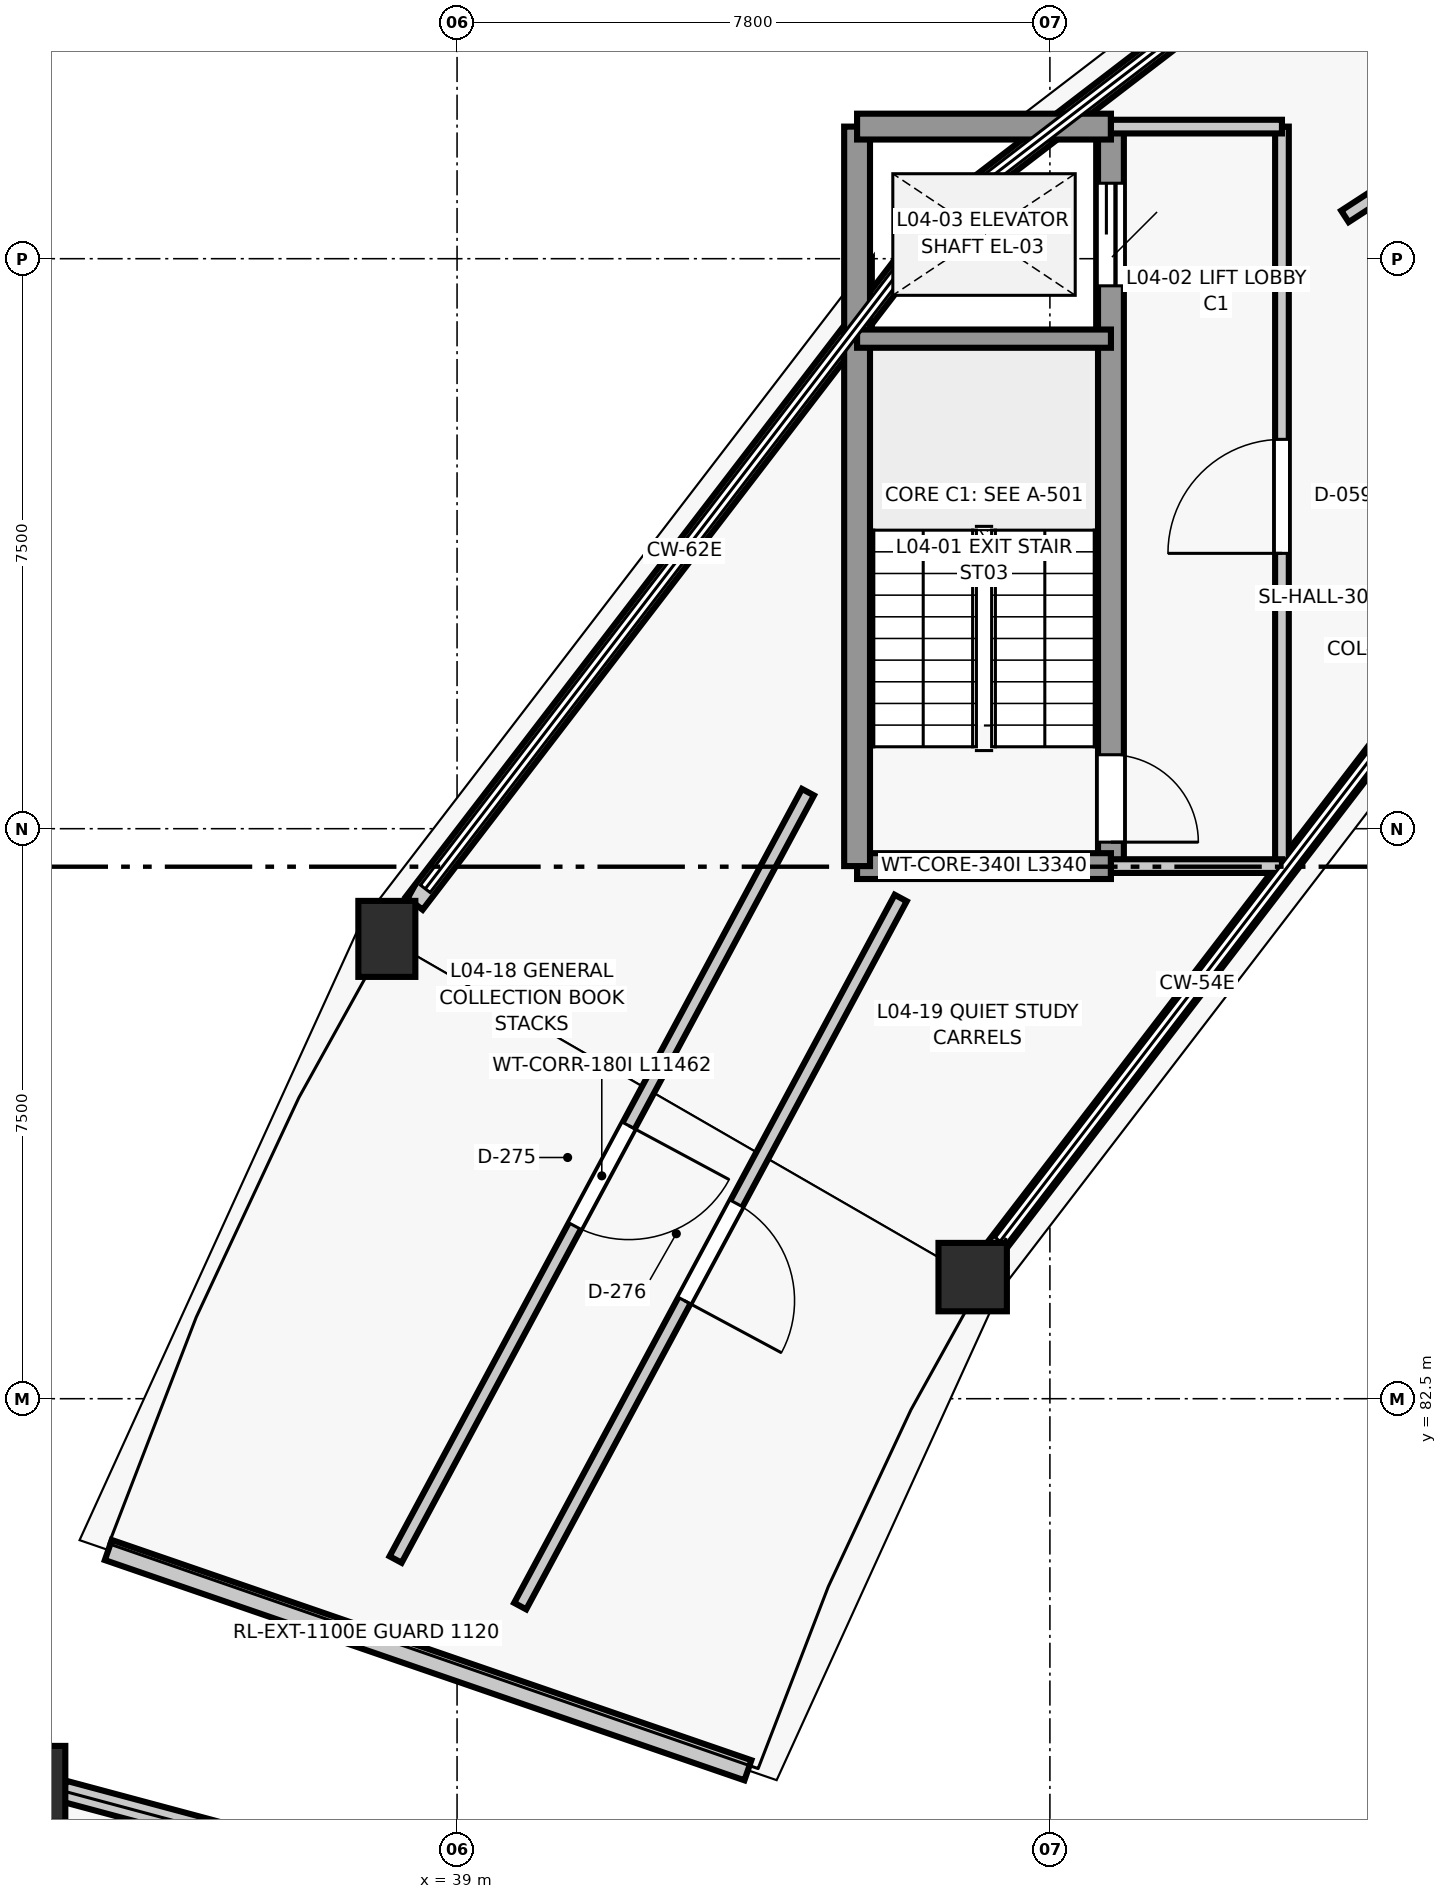
"""IFC4 building model, lengths in metres.
Left out: names, types, materials, properties, quantities, classifications, styles, units other than length and angle.
Written with IfcOpenShell. Run it as: python <this file> out.ifc"""

import sys

from ifc_helpers import new_model, si_unit, direction, frame, frame_2d, origin, origin_2d, place, context, subcontext, project, spatial, rectangle, circle, extrude, element, fill, save


model = new_model("IFC4")
c1 = context("Model", 3, precision=1e-05, world=origin(), true_north=direction((0.0, 1.0)))
c2 = subcontext(c1, "Body", "Model", "MODEL_VIEW")
j1 = project(units=[si_unit("LENGTHUNIT", "METRE"), si_unit("PLANEANGLEUNIT", "RADIAN")], contexts=[c1])
p1 = place(None, origin())
s1 = spatial("IfcSite", under=j1, at=p1, CompositionType="ELEMENT")
p2 = place(p1, origin())
s2 = spatial("IfcBuilding", under=s1, at=p2, CompositionType="ELEMENT")
p3 = place(p2, frame((0.0, 0.0, 16.5)))
s3 = spatial("IfcBuildingStorey", under=s2, at=p3, CompositionType="ELEMENT", Elevation=16.5)
p4 = place(p3, frame((45.784, 84.1, 0.0), z_axis=(0.0, 0.0, 1.0), x_axis=(1.0, 0.0, 0.0)))
e1 = element("IfcColumn", 1, at=p4, inside=s3, PredefinedType="COLUMN", context=c2, shape_type="SweptSolid", body=[
    extrude(circle(Radius=0.45, at=origin_2d()), origin(), (0.0, 0.0, 1.0), 3.9),
])
for number, where, z_axis, x_axis in (
    (2, (38.076, 88.55, 0.0), (0.0, 0.0, 1.0), (1.0, 0.0, 0.0)),
    (3, (33.471, 77.432, 0.0), (0.0, 0.0, 1.0), (1.0, 0.0, 0.0)),
):
    element("IfcColumn", number, at=place(p3, frame(where, z_axis=z_axis, x_axis=x_axis)), inside=s3, PredefinedType="COLUMN", context=c2, shape_type="SweptSolid", body=[
        extrude(rectangle(XDim=0.75, YDim=1.0, at=origin_2d()), origin(), (0.0, 0.0, 1.0), 3.9),
    ])
p5 = place(p3, frame((45.402, 98.098, 0.0), z_axis=(0.0, 0.0, 1.0), x_axis=(0.793347191248, 0.608769442514, 0.0)))
e4 = element("IfcWall", 4, at=p5, inside=s3, PredefinedType="STANDARD", context=c2, shape_type="SweptSolid", body=[
    extrude(rectangle(XDim=11.587, YDim=0.28, at=frame_2d((5.793, 0.0))), origin(), (0.0, 0.0, 1.0), 0.82),
])
p6 = place(p3, frame((38.436, 89.019, 0.0), z_axis=(0.0, 0.0, 1.0), x_axis=(0.608753523874, 0.793359406052, 0.0)))
e5 = element("IfcWall", 5, at=p6, inside=s3, PredefinedType="STANDARD", context=c2, shape_type="SweptSolid", body=[
    extrude(rectangle(XDim=11.444, YDim=0.28, at=frame_2d((5.722, 0.0))), origin(), (0.0, 0.0, 1.0), 0.82),
])
p7 = place(p3, frame((51.481, 91.524, 0.0), z_axis=(0.0, 0.0, 1.0), x_axis=(-0.608769580289, -0.793347085527, 0.0)))
e6 = element("IfcWall", 6, at=p7, inside=s3, PredefinedType="STANDARD", context=c2, shape_type="SweptSolid", body=[
    extrude(rectangle(XDim=9.005, YDim=0.25, at=frame_2d((4.502, 0.0))), origin(), (0.0, 0.0, 1.0), 0.82),
])
p8 = place(p3, frame((42.827, 77.611, 0.0), z_axis=(0.0, 0.0, 1.0), x_axis=(-0.945512530801, 0.325585709298, 0.0)))
e7 = element("IfcWall", 7, at=p8, inside=s3, PredefinedType="STANDARD", context=c2, shape_type="SweptSolid", body=[
    extrude(rectangle(XDim=8.9, YDim=0.28, at=frame_2d((4.45, 0.0))), origin(), (0.0, 0.0, 1.0), 3.63),
])
p9 = place(p3, frame((33.822, 77.338, 0.0), z_axis=(0.0, 0.0, 1.0), x_axis=(0.965919918576, -0.258841091981, 0.0)))
e8 = element("IfcWall", 8, at=p9, inside=s3, PredefinedType="STANDARD", context=c2, shape_type="SweptSolid", body=[
    extrude(rectangle(XDim=8.251, YDim=0.28, at=frame_2d((4.125, 0.0))), origin(), (0.0, 0.0, 1.0), 2.997),
])
p10 = place(p3, frame((47.603, 99.238, 0.0), z_axis=(0.0, 0.0, 1.0), x_axis=(0.0, -1.0, 0.0)))
e9 = element("IfcWall", 9, at=p10, inside=s3, PredefinedType="SHEAR", context=c2, shape_type="SweptSolid", body=[
    extrude(rectangle(XDim=9.73, YDim=0.34, at=frame_2d((4.865, 0.0))), origin(), (0.0, 0.0, 1.0), 3.9),
])
p11 = place(p10, frame((8.265, 0.0, 0.0)))
e10 = element("IfcOpeningElement", 10, at=p11, cuts=e9, PredefinedType="OPENING", context=c2, shape_type="SweptSolid", body=[
    extrude(rectangle(XDim=1.15, YDim=2.15, at=frame_2d((0.575, 1.075))), frame((0.0, 0.18, 0.0), z_axis=(0.0, -1.0, 0.0), x_axis=(1.0, 0.0, 0.0)), (0.0, 0.0, 1.0), 0.36),
])
p12 = place(p10, frame((0.745, 0.0, 0.0)))
e11 = element("IfcOpeningElement", 11, at=p12, cuts=e9, PredefinedType="OPENING", context=c2, shape_type="SweptSolid", body=[
    extrude(rectangle(XDim=1.35, YDim=2.15, at=frame_2d((0.675, 1.075))), frame((0.0, 0.18, 0.0), z_axis=(0.0, -1.0, 0.0), x_axis=(1.0, 0.0, 0.0)), (0.0, 0.0, 1.0), 0.36),
])
p13 = place(p3, frame((47.603, 89.508, 0.0), z_axis=(0.0, 0.0, 1.0), x_axis=(-1.0, 0.0, 0.0)))
e12 = element("IfcWall", 12, at=p13, inside=s3, PredefinedType="SHEAR", context=c2, shape_type="SweptSolid", body=[
    extrude(rectangle(XDim=3.34, YDim=0.34, at=frame_2d((1.67, 0.0))), origin(), (0.0, 0.0, 1.0), 3.9),
])
p14 = place(p3, frame((44.263, 89.508, 0.0), z_axis=(0.0, 0.0, 1.0), x_axis=(0.0, 1.0, 0.0)))
e13 = element("IfcWall", 13, at=p14, inside=s3, PredefinedType="SHEAR", context=c2, shape_type="SweptSolid", body=[
    extrude(rectangle(XDim=9.73, YDim=0.34, at=frame_2d((4.865, 0.0))), origin(), (0.0, 0.0, 1.0), 3.9),
])
p15 = place(p3, frame((44.263, 99.238, 0.0), z_axis=(0.0, 0.0, 1.0), x_axis=(1.0, 0.0, 0.0)))
e14 = element("IfcWall", 14, at=p15, inside=s3, PredefinedType="SHEAR", context=c2, shape_type="SweptSolid", body=[
    extrude(rectangle(XDim=3.34, YDim=0.34, at=frame_2d((1.67, 0.0))), origin(), (0.0, 0.0, 1.0), 3.9),
])
p16 = place(p3, frame((47.603, 96.448, 0.0), z_axis=(0.0, 0.0, 1.0), x_axis=(-1.0, 0.0, 0.0)))
e15 = element("IfcWall", 15, at=p16, inside=s3, PredefinedType="SHEAR", context=c2, shape_type="SweptSolid", body=[
    extrude(rectangle(XDim=3.34, YDim=0.24, at=frame_2d((1.67, 0.0))), origin(), (0.0, 0.0, 1.0), 3.9),
])
p17 = place(p3, frame((49.853, 89.508, 0.0), z_axis=(0.0, 0.0, 1.0), x_axis=(0.0, 1.0, 0.0)))
e16 = element("IfcWall", 16, at=p17, inside=s3, PredefinedType="PARTITIONING", context=c2, shape_type="SweptSolid", body=[
    extrude(rectangle(XDim=9.73, YDim=0.18, at=frame_2d((4.865, 0.0))), origin(), (0.0, 0.0, 1.0), 3.635),
])
p18 = place(p17, frame((4.115, 0.0, 0.0)))
e17 = element("IfcOpeningElement", 17, at=p18, cuts=e16, PredefinedType="OPENING", context=c2, shape_type="SweptSolid", body=[
    extrude(rectangle(XDim=1.5, YDim=2.15, at=frame_2d((0.75, 1.075))), frame((0.0, 0.1, 0.0), z_axis=(0.0, -1.0, 0.0), x_axis=(1.0, 0.0, 0.0)), (0.0, 0.0, 1.0), 0.2),
])
for number, where, z_axis, x_axis in (
    (18, (47.603, 89.508, 0.0), (0.0, 0.0, 1.0), (1.0, 0.0, 0.0)),
    (19, (47.603, 99.238, 0.0), (0.0, 0.0, 1.0), (1.0, 0.0, 0.0)),
):
    element("IfcWall", number, at=place(p3, frame(where, z_axis=z_axis, x_axis=x_axis)), inside=s3, PredefinedType="PARTITIONING", context=c2, shape_type="SweptSolid", body=[
        extrude(rectangle(XDim=2.25, YDim=0.18, at=frame_2d((1.125, 0.0))), origin(), (0.0, 0.0, 1.0), 3.635),
    ])
p19 = place(p3, frame((59.369, 103.699, 0.0), z_axis=(0.0, 0.0, 1.0), x_axis=(-0.838672389469, -0.544636230104, 0.0)))
e20 = element("IfcWall", 20, at=p19, inside=s3, PredefinedType="PARTITIONING", context=c2, shape_type="SweptSolid", body=[
    extrude(rectangle(XDim=10.359, YDim=0.18, at=frame_2d((5.179, 0.0))), origin(), (0.0, 0.0, 1.0), 3.635),
])
p20 = place(p19, frame((4.654, 0.0, 0.0)))
e21 = element("IfcOpeningElement", 21, at=p20, cuts=e20, PredefinedType="OPENING", context=c2, shape_type="SweptSolid", body=[
    extrude(rectangle(XDim=1.05, YDim=2.1, at=frame_2d((0.525, 1.05))), frame((0.0, 0.1, 0.0), z_axis=(0.0, -1.0, 0.0), x_axis=(1.0, 0.0, 0.0)), (0.0, 0.0, 1.0), 0.2),
])
p21 = place(p3, frame((43.617, 90.481, 0.0), z_axis=(0.0, 0.0, 1.0), x_axis=(-0.473312147023, -0.880894778893, 0.0)))
e22 = element("IfcWall", 22, at=p21, inside=s3, PredefinedType="PARTITIONING", context=c2, shape_type="SweptSolid", body=[
    extrude(rectangle(XDim=11.462, YDim=0.18, at=frame_2d((5.731, 0.0))), origin(), (0.0, 0.0, 1.0), 3.635),
])
p22 = place(p21, frame((4.981, 0.0, 0.0)))
e23 = element("IfcOpeningElement", 23, at=p22, cuts=e22, PredefinedType="OPENING", context=c2, shape_type="SweptSolid", body=[
    extrude(rectangle(XDim=1.5, YDim=2.15, at=frame_2d((0.75, 1.075))), frame((0.0, 0.1, 0.0), z_axis=(0.0, -1.0, 0.0), x_axis=(1.0, 0.0, 0.0)), (0.0, 0.0, 1.0), 0.2),
])
p23 = place(p3, frame((44.837, 89.088, 0.0), z_axis=(0.0, 0.0, 1.0), x_axis=(-0.47333431402, -0.88088286802, 0.0)))
e24 = element("IfcWall", 24, at=p23, inside=s3, PredefinedType="PARTITIONING", context=c2, shape_type="SweptSolid", body=[
    extrude(rectangle(XDim=10.577, YDim=0.18, at=frame_2d((5.288, 0.0))), origin(), (0.0, 0.0, 1.0), 3.274),
])
p24 = place(p23, frame((4.563, 0.0, 0.0)))
e25 = element("IfcOpeningElement", 25, at=p24, cuts=e24, PredefinedType="OPENING", context=c2, shape_type="SweptSolid", body=[
    extrude(rectangle(XDim=1.45, YDim=2.2, at=frame_2d((0.725, 1.1))), frame((0.0, 0.1, 0.0), z_axis=(0.0, -1.0, 0.0), x_axis=(1.0, 0.0, 0.0)), (0.0, 0.0, 1.0), 0.2),
])
p25 = place(p11, origin())
e26 = element("IfcDoor", 26, at=p25, inside=s3, OperationType="SINGLE_SWING_RIGHT", PredefinedType="DOOR", context=c2, shape_type="SweptSolid", body=[
    extrude(rectangle(XDim=1.15, YDim=2.15, at=frame_2d((0.575, 1.075))), frame((0.0, 0.025, 0.0), z_axis=(0.0, -1.0, 0.0), x_axis=(1.0, 0.0, 0.0)), (0.0, 0.0, 1.0), 0.05),
])
fill(e10, e26)
p26 = place(p12, origin())
e27 = element("IfcDoor", 27, at=p26, inside=s3, OperationType="SLIDING_TO_LEFT", PredefinedType="DOOR", context=c2, shape_type="SweptSolid", body=[
    extrude(rectangle(XDim=1.35, YDim=2.15, at=frame_2d((0.675, 1.075))), frame((0.0, 0.025, 0.0), z_axis=(0.0, -1.0, 0.0), x_axis=(1.0, 0.0, 0.0)), (0.0, 0.0, 1.0), 0.05),
])
fill(e11, e27)
p27 = place(p18, origin())
e28 = element("IfcDoor", 28, at=p27, inside=s3, OperationType="SINGLE_SWING_LEFT", PredefinedType="DOOR", context=c2, shape_type="SweptSolid", body=[
    extrude(rectangle(XDim=1.5, YDim=2.15, at=frame_2d((0.75, 1.075))), frame((0.0, 0.025, 0.0), z_axis=(0.0, -1.0, 0.0), x_axis=(1.0, 0.0, 0.0)), (0.0, 0.0, 1.0), 0.05),
])
fill(e17, e28)
p28 = place(p22, origin())
e29 = element("IfcDoor", 29, at=p28, inside=s3, OperationType="SINGLE_SWING_LEFT", PredefinedType="DOOR", context=c2, shape_type="SweptSolid", body=[
    extrude(rectangle(XDim=1.5, YDim=2.15, at=frame_2d((0.75, 1.075))), frame((0.0, 0.025, 0.0), z_axis=(0.0, -1.0, 0.0), x_axis=(1.0, 0.0, 0.0)), (0.0, 0.0, 1.0), 0.05),
])
fill(e23, e29)
p29 = place(p24, origin())
e30 = element("IfcDoor", 30, at=p29, inside=s3, OperationType="SINGLE_SWING_RIGHT", PredefinedType="DOOR", context=c2, shape_type="SweptSolid", body=[
    extrude(rectangle(XDim=1.45, YDim=2.2, at=frame_2d((0.725, 1.1))), frame((0.0, 0.025, 0.0), z_axis=(0.0, -1.0, 0.0), x_axis=(1.0, 0.0, 0.0)), (0.0, 0.0, 1.0), 0.05),
])
fill(e25, e30)
save(model, sys.argv[1])
